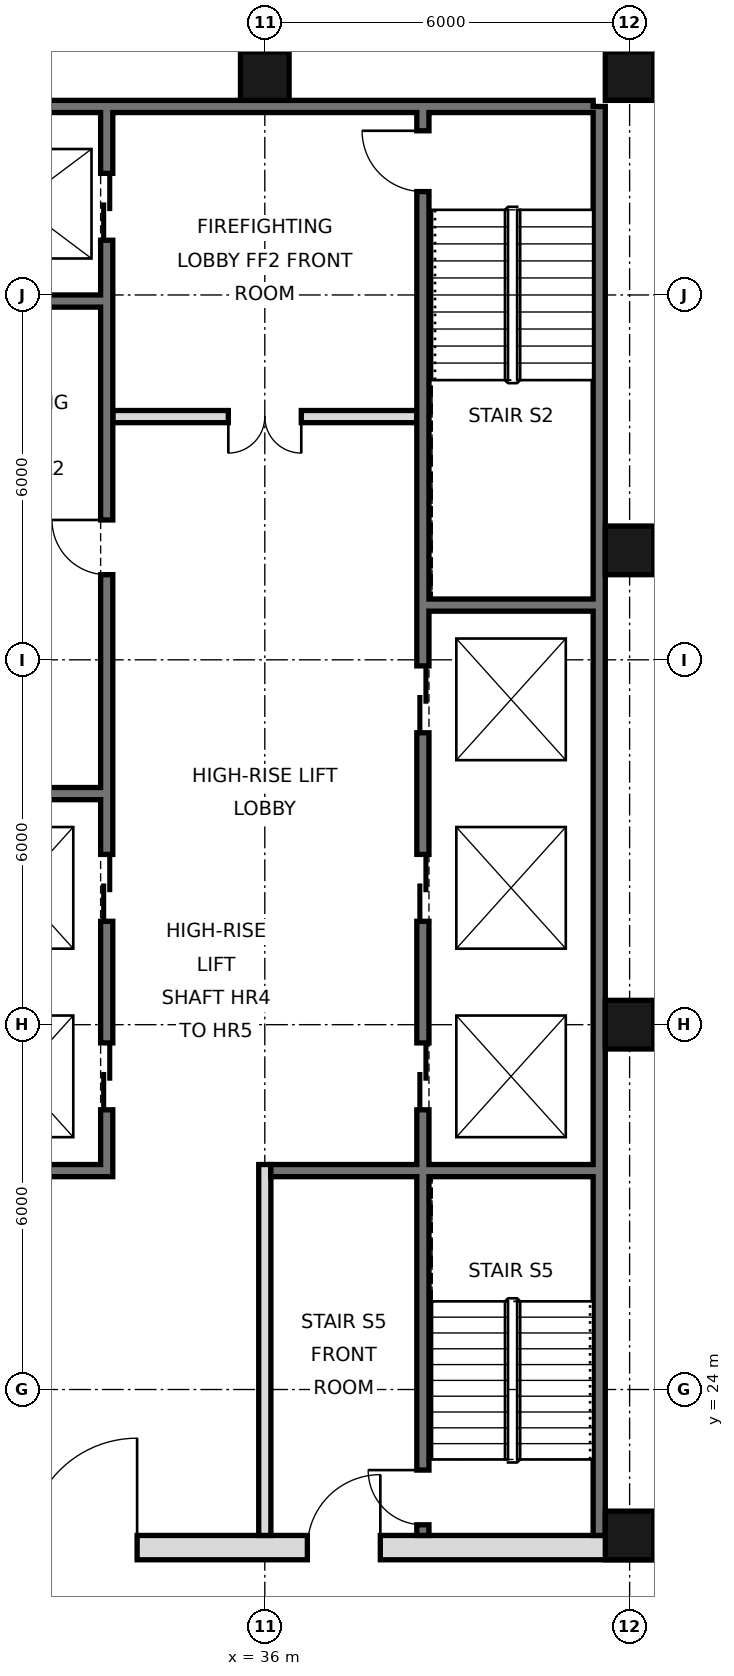
"""IFC4 building model, lengths in metres.
Left out: names, types, materials, properties, quantities, classifications, styles, units other than length and angle.
Written with IfcOpenShell. Run it as: python <this file> out.ifc"""

import sys

from ifc_helpers import new_model, si_unit, direction, frame, frame_2d, origin, origin_2d, place, context, subcontext, project, spatial, rectangle, hollow_rectangle, extrude, element, fill, save


model = new_model("IFC4")
c1 = context("Model", 3, precision=1e-05, world=origin(), true_north=direction((0.0, 1.0)))
c2 = subcontext(c1, "Body", "Model", "MODEL_VIEW")
j1 = project(units=[si_unit("LENGTHUNIT", "METRE"), si_unit("PLANEANGLEUNIT", "RADIAN")], contexts=[c1])
p1 = place(None, origin())
s1 = spatial("IfcSite", under=j1, at=p1, CompositionType="ELEMENT")
p2 = place(p1, origin())
s2 = spatial("IfcBuilding", under=s1, at=p2, CompositionType="ELEMENT")
p3 = place(p2, frame((0.0, 0.0, 222.6)))
s3 = spatial("IfcBuildingStorey", under=s2, at=p3, CompositionType="ELEMENT", Elevation=222.6)
for number, where, z_axis, x_axis in (
    (1, (36.0, 45.6, 0.0), (0.0, 0.0, 1.0), (1.0, 0.0, 0.0)),
    (2, (42.0, 21.6, 0.0), (0.0, 0.0, 1.0), (1.0, 0.0, 0.0)),
    (3, (42.0, 30.0, 0.0), (0.0, 0.0, 1.0), (1.0, 0.0, 0.0)),
    (4, (42.0, 37.8, 0.0), (0.0, 0.0, 1.0), (1.0, 0.0, 0.0)),
    (5, (42.0, 45.6, 0.0), (0.0, 0.0, 1.0), (1.0, 0.0, 0.0)),
):
    element("IfcColumn", number, at=place(p3, frame(where, z_axis=z_axis, x_axis=x_axis)), inside=s3, PredefinedType="COLUMN", context=c2, shape_type="SweptSolid", body=[
        extrude(hollow_rectangle(XDim=0.8, YDim=0.8, WallThickness=0.04, at=origin_2d()), origin(), (0.0, 0.0, 1.0), 3.6),
    ])
p4 = place(p3, frame((41.5, 21.6, 0.0), z_axis=(0.0, 0.0, 1.0), x_axis=(0.0, 1.0, 0.0)))
e6 = element("IfcWall", 6, at=p4, inside=s3, PredefinedType="SOLIDWALL", context=c2, shape_type="SweptSolid", body=[
    extrude(rectangle(XDim=23.5, YDim=0.2, at=frame_2d((11.75, 0.0))), origin(), (0.0, 0.0, 1.0), 3.42),
])
p5 = place(p3, frame((6.6, 45.1, 0.0), z_axis=(0.0, 0.0, 1.0), x_axis=(1.0, 0.0, 0.0)))
e7 = element("IfcWall", 7, at=p5, inside=s3, PredefinedType="SOLIDWALL", context=c2, shape_type="SweptSolid", body=[
    extrude(rectangle(XDim=34.8, YDim=0.2, at=frame_2d((17.4, 0.0))), origin(), (0.0, 0.0, 1.0), 3.42),
])
p6 = place(p3, frame((5.6, 21.4, 0.0), z_axis=(0.0, 0.0, 1.0), x_axis=(1.0, 0.0, 0.0)))
e8 = element("IfcWall", 8, at=p6, inside=s3, PredefinedType="SOLIDWALL", context=c2, shape_type="SweptSolid", body=[
    extrude(rectangle(XDim=36.8, YDim=0.4, at=frame_2d((18.4, 0.0))), origin(), (0.0, 0.0, 1.0), 3.42),
])
p7 = place(p6, frame((8.5, 0.0, 0.0)))
e9 = element("IfcOpeningElement", 9, at=p7, cuts=e8, PredefinedType="OPENING", context=c2, shape_type="SweptSolid", body=[
    extrude(rectangle(XDim=1.8, YDim=2.1, at=frame_2d((0.9, 1.05))), frame((0.0, 0.21, 0.0), z_axis=(0.0, -1.0, 0.0), x_axis=(1.0, 0.0, 0.0)), (0.0, 0.0, 1.0), 0.42),
])
p8 = place(p6, frame((17.5, 0.0, 0.0)))
e10 = element("IfcOpeningElement", 10, at=p8, cuts=e8, PredefinedType="OPENING", context=c2, shape_type="SweptSolid", body=[
    extrude(rectangle(XDim=1.8, YDim=2.1, at=frame_2d((0.9, 1.05))), frame((0.0, 0.21, 0.0), z_axis=(0.0, -1.0, 0.0), x_axis=(1.0, 0.0, 0.0)), (0.0, 0.0, 1.0), 0.42),
])
p9 = place(p6, frame((26.5, 0.0, 0.0)))
e11 = element("IfcOpeningElement", 11, at=p9, cuts=e8, PredefinedType="OPENING", context=c2, shape_type="SweptSolid", body=[
    extrude(rectangle(XDim=1.8, YDim=2.1, at=frame_2d((0.9, 1.05))), frame((0.0, 0.21, 0.0), z_axis=(0.0, -1.0, 0.0), x_axis=(1.0, 0.0, 0.0)), (0.0, 0.0, 1.0), 0.42),
])
p10 = place(p6, frame((4.5, 0.0, 0.0)))
e12 = element("IfcOpeningElement", 12, at=p10, cuts=e8, PredefinedType="OPENING", context=c2, shape_type="SweptSolid", body=[
    extrude(rectangle(XDim=1.2, YDim=2.1, at=frame_2d((0.6, 1.05))), frame((0.0, 0.21, 0.0), z_axis=(0.0, -1.0, 0.0), x_axis=(1.0, 0.0, 0.0)), (0.0, 0.0, 1.0), 0.42),
])
p11 = place(p6, frame((31.1, 0.0, 0.0)))
e13 = element("IfcOpeningElement", 13, at=p11, cuts=e8, PredefinedType="OPENING", context=c2, shape_type="SweptSolid", body=[
    extrude(rectangle(XDim=1.2, YDim=2.1, at=frame_2d((0.6, 1.05))), frame((0.0, 0.21, 0.0), z_axis=(0.0, -1.0, 0.0), x_axis=(1.0, 0.0, 0.0)), (0.0, 0.0, 1.0), 0.42),
])
p12 = place(p3, frame((33.4, 27.5, 0.0), z_axis=(0.0, 0.0, 1.0), x_axis=(0.0, 1.0, 0.0)))
e14 = element("IfcWall", 14, at=p12, inside=s3, PredefinedType="SOLIDWALL", context=c2, shape_type="SweptSolid", body=[
    extrude(rectangle(XDim=17.5, YDim=0.2, at=frame_2d((8.75, 0.0))), origin(), (0.0, 0.0, 1.0), 3.42),
])
p13 = place(p12, frame((1.1, 0.0, 0.0)))
e15 = element("IfcOpeningElement", 15, at=p13, cuts=e14, PredefinedType="OPENING", context=c2, shape_type="SweptSolid", body=[
    extrude(rectangle(XDim=1.1, YDim=2.1, at=frame_2d((0.55, 1.05))), frame((0.0, 0.11, 0.0), z_axis=(0.0, -1.0, 0.0), x_axis=(1.0, 0.0, 0.0)), (0.0, 0.0, 1.0), 0.22),
])
p14 = place(p12, frame((4.2, 0.0, 0.0)))
e16 = element("IfcOpeningElement", 16, at=p14, cuts=e14, PredefinedType="OPENING", context=c2, shape_type="SweptSolid", body=[
    extrude(rectangle(XDim=1.1, YDim=2.1, at=frame_2d((0.55, 1.05))), frame((0.0, 0.11, 0.0), z_axis=(0.0, -1.0, 0.0), x_axis=(1.0, 0.0, 0.0)), (0.0, 0.0, 1.0), 0.22),
])
p15 = place(p12, frame((15.4, 0.0, 0.0)))
e17 = element("IfcOpeningElement", 17, at=p15, cuts=e14, PredefinedType="OPENING", context=c2, shape_type="SweptSolid", body=[
    extrude(rectangle(XDim=1.1, YDim=2.1, at=frame_2d((0.55, 1.05))), frame((0.0, 0.11, 0.0), z_axis=(0.0, -1.0, 0.0), x_axis=(1.0, 0.0, 0.0)), (0.0, 0.0, 1.0), 0.22),
])
p16 = place(p12, frame((9.9, 0.0, 0.0)))
e18 = element("IfcOpeningElement", 18, at=p16, cuts=e14, PredefinedType="OPENING", context=c2, shape_type="SweptSolid", body=[
    extrude(rectangle(XDim=0.9, YDim=2.1, at=frame_2d((0.45, 1.05))), frame((0.0, 0.11, 0.0), z_axis=(0.0, -1.0, 0.0), x_axis=(1.0, 0.0, 0.0)), (0.0, 0.0, 1.0), 0.22),
])
p17 = place(p3, frame((36.0, 21.6, 0.0), z_axis=(0.0, 0.0, 1.0), x_axis=(0.0, 1.0, 0.0)))
e19 = element("IfcWall", 19, at=p17, inside=s3, PredefinedType="PARTITIONING", context=c2, shape_type="SweptSolid", body=[
    extrude(rectangle(XDim=6.1, YDim=0.2, at=frame_2d((3.05, 0.0))), origin(), (0.0, 0.0, 1.0), 3.42),
])
p18 = place(p3, frame((38.6, 21.6, 0.0), z_axis=(0.0, 0.0, 1.0), x_axis=(0.0, 1.0, 0.0)))
e20 = element("IfcWall", 20, at=p18, inside=s3, PredefinedType="SOLIDWALL", context=c2, shape_type="SweptSolid", body=[
    extrude(rectangle(XDim=23.4, YDim=0.2, at=frame_2d((11.7, 0.0))), origin(), (0.0, 0.0, 1.0), 3.42),
])
p19 = place(p18, frame((7.0, 0.0, 0.0)))
e21 = element("IfcOpeningElement", 21, at=p19, cuts=e20, PredefinedType="OPENING", context=c2, shape_type="SweptSolid", body=[
    extrude(rectangle(XDim=1.1, YDim=2.1, at=frame_2d((0.55, 1.05))), frame((0.0, 0.11, 0.0), z_axis=(0.0, -1.0, 0.0), x_axis=(1.0, 0.0, 0.0)), (0.0, 0.0, 1.0), 0.22),
])
p20 = place(p18, frame((10.1, 0.0, 0.0)))
e22 = element("IfcOpeningElement", 22, at=p20, cuts=e20, PredefinedType="OPENING", context=c2, shape_type="SweptSolid", body=[
    extrude(rectangle(XDim=1.1, YDim=2.1, at=frame_2d((0.55, 1.05))), frame((0.0, 0.11, 0.0), z_axis=(0.0, -1.0, 0.0), x_axis=(1.0, 0.0, 0.0)), (0.0, 0.0, 1.0), 0.22),
])
p21 = place(p18, frame((13.2, 0.0, 0.0)))
e23 = element("IfcOpeningElement", 23, at=p21, cuts=e20, PredefinedType="OPENING", context=c2, shape_type="SweptSolid", body=[
    extrude(rectangle(XDim=1.1, YDim=2.1, at=frame_2d((0.55, 1.05))), frame((0.0, 0.11, 0.0), z_axis=(0.0, -1.0, 0.0), x_axis=(1.0, 0.0, 0.0)), (0.0, 0.0, 1.0), 0.22),
])
p22 = place(p18, frame((22.1, 0.0, 0.0)))
e24 = element("IfcOpeningElement", 24, at=p22, cuts=e20, PredefinedType="OPENING", context=c2, shape_type="SweptSolid", body=[
    extrude(rectangle(XDim=1.0, YDim=2.1, at=frame_2d((0.5, 1.05))), frame((0.0, 0.11, 0.0), z_axis=(0.0, -1.0, 0.0), x_axis=(1.0, 0.0, 0.0)), (0.0, 0.0, 1.0), 0.22),
])
p23 = place(p18, frame((0.175, 0.0, 0.0)))
e25 = element("IfcOpeningElement", 25, at=p23, cuts=e20, PredefinedType="OPENING", context=c2, shape_type="SweptSolid", body=[
    extrude(rectangle(XDim=0.9, YDim=2.1, at=frame_2d((0.45, 1.05))), frame((0.0, 0.11, 0.0), z_axis=(0.0, -1.0, 0.0), x_axis=(1.0, 0.0, 0.0)), (0.0, 0.0, 1.0), 0.22),
])
p24 = place(p3, frame((30.6, 27.6, 0.0), z_axis=(0.0, 0.0, 1.0), x_axis=(1.0, 0.0, 0.0)))
e26 = element("IfcWall", 26, at=p24, inside=s3, PredefinedType="SOLIDWALL", context=c2, shape_type="SweptSolid", body=[
    extrude(rectangle(XDim=2.7, YDim=0.2, at=frame_2d((1.35, 0.0))), origin(), (0.0, 0.0, 1.0), 3.42),
])
p25 = place(p3, frame((36.1, 27.6, 0.0), z_axis=(0.0, 0.0, 1.0), x_axis=(1.0, 0.0, 0.0)))
e27 = element("IfcWall", 27, at=p25, inside=s3, PredefinedType="SOLIDWALL", context=c2, shape_type="SweptSolid", body=[
    extrude(rectangle(XDim=5.3, YDim=0.2, at=frame_2d((2.65, 0.0))), origin(), (0.0, 0.0, 1.0), 3.42),
])
for number, where, z_axis, x_axis in (
    (28, (30.6, 33.8, 0.0), (0.0, 0.0, 1.0), (1.0, 0.0, 0.0)),
    (29, (38.7, 36.9, 0.0), (0.0, 0.0, 1.0), (1.0, 0.0, 0.0)),
):
    element("IfcWall", number, at=place(p3, frame(where, z_axis=z_axis, x_axis=x_axis)), inside=s3, PredefinedType="SOLIDWALL", context=c2, shape_type="SweptSolid", body=[
        extrude(rectangle(XDim=2.7, YDim=0.2, at=frame_2d((1.35, 0.0))), origin(), (0.0, 0.0, 1.0), 3.42),
    ])
p26 = place(p3, frame((33.5, 40.0, 0.0), z_axis=(0.0, 0.0, 1.0), x_axis=(1.0, 0.0, 0.0)))
e30 = element("IfcWall", 30, at=p26, inside=s3, PredefinedType="PARTITIONING", context=c2, shape_type="SweptSolid", body=[
    extrude(rectangle(XDim=5.0, YDim=0.2, at=frame_2d((2.5, 0.0))), origin(), (0.0, 0.0, 1.0), 3.42),
])
p27 = place(p26, frame((1.9, 0.0, 0.0)))
e31 = element("IfcOpeningElement", 31, at=p27, cuts=e30, PredefinedType="OPENING", context=c2, shape_type="SweptSolid", body=[
    extrude(rectangle(XDim=1.2, YDim=2.1, at=frame_2d((0.6, 1.05))), frame((0.0, 0.11, 0.0), z_axis=(0.0, -1.0, 0.0), x_axis=(1.0, 0.0, 0.0)), (0.0, 0.0, 1.0), 0.22),
])
p28 = place(p3, frame((30.6, 41.9, 0.0), z_axis=(0.0, 0.0, 1.0), x_axis=(1.0, 0.0, 0.0)))
e32 = element("IfcWall", 32, at=p28, inside=s3, PredefinedType="SOLIDWALL", context=c2, shape_type="SweptSolid", body=[
    extrude(rectangle(XDim=2.7, YDim=0.2, at=frame_2d((1.35, 0.0))), origin(), (0.0, 0.0, 1.0), 3.42),
])
p29 = place(p9, frame((1.8, 0.0, 0.0), z_axis=(0.0, 0.0, 1.0), x_axis=(-1.0, 0.0, 0.0)))
e33 = element("IfcDoor", 33, at=p29, inside=s3, OperationType="SINGLE_SWING_LEFT", PredefinedType="DOOR", context=c2, shape_type="SweptSolid", body=[
    extrude(rectangle(XDim=1.8, YDim=2.1, at=frame_2d((0.9, 1.05))), frame((0.0, 0.025, 0.0), z_axis=(0.0, -1.0, 0.0), x_axis=(1.0, 0.0, 0.0)), (0.0, 0.0, 1.0), 0.05),
])
fill(e11, e33)
p30 = place(p11, frame((1.2, 0.0, 0.0), z_axis=(0.0, 0.0, 1.0), x_axis=(-1.0, 0.0, 0.0)))
e34 = element("IfcDoor", 34, at=p30, inside=s3, OperationType="SINGLE_SWING_LEFT", PredefinedType="DOOR", context=c2, shape_type="SweptSolid", body=[
    extrude(rectangle(XDim=1.2, YDim=2.1, at=frame_2d((0.6, 1.05))), frame((0.0, 0.025, 0.0), z_axis=(0.0, -1.0, 0.0), x_axis=(1.0, 0.0, 0.0)), (0.0, 0.0, 1.0), 0.05),
])
fill(e13, e34)
p31 = place(p27, frame((1.2, 0.0, 0.0), z_axis=(0.0, 0.0, 1.0), x_axis=(-1.0, 0.0, 0.0)))
e35 = element("IfcDoor", 35, at=p31, inside=s3, OperationType="DOUBLE_DOOR_SINGLE_SWING", PredefinedType="DOOR", context=c2, shape_type="SweptSolid", body=[
    extrude(rectangle(XDim=1.2, YDim=2.1, at=frame_2d((0.6, 1.05))), frame((0.0, 0.025, 0.0), z_axis=(0.0, -1.0, 0.0), x_axis=(1.0, 0.0, 0.0)), (0.0, 0.0, 1.0), 0.05),
])
fill(e31, e35)
p32 = place(p19, origin())
e36 = element("IfcDoor", 36, at=p32, inside=s3, OperationType="DOUBLE_DOOR_SLIDING", PredefinedType="DOOR", context=c2, shape_type="SweptSolid", body=[
    extrude(rectangle(XDim=1.1, YDim=2.1, at=frame_2d((0.55, 1.05))), frame((0.0, 0.025, 0.0), z_axis=(0.0, -1.0, 0.0), x_axis=(1.0, 0.0, 0.0)), (0.0, 0.0, 1.0), 0.05),
])
fill(e21, e36)
p33 = place(p20, origin())
e37 = element("IfcDoor", 37, at=p33, inside=s3, OperationType="DOUBLE_DOOR_SLIDING", PredefinedType="DOOR", context=c2, shape_type="SweptSolid", body=[
    extrude(rectangle(XDim=1.1, YDim=2.1, at=frame_2d((0.55, 1.05))), frame((0.0, 0.025, 0.0), z_axis=(0.0, -1.0, 0.0), x_axis=(1.0, 0.0, 0.0)), (0.0, 0.0, 1.0), 0.05),
])
fill(e22, e37)
p34 = place(p21, origin())
e38 = element("IfcDoor", 38, at=p34, inside=s3, OperationType="DOUBLE_DOOR_SLIDING", PredefinedType="DOOR", context=c2, shape_type="SweptSolid", body=[
    extrude(rectangle(XDim=1.1, YDim=2.1, at=frame_2d((0.55, 1.05))), frame((0.0, 0.025, 0.0), z_axis=(0.0, -1.0, 0.0), x_axis=(1.0, 0.0, 0.0)), (0.0, 0.0, 1.0), 0.05),
])
fill(e23, e38)
p35 = place(p13, origin())
e39 = element("IfcDoor", 39, at=p35, inside=s3, OperationType="DOUBLE_DOOR_SLIDING", PredefinedType="DOOR", context=c2, shape_type="SweptSolid", body=[
    extrude(rectangle(XDim=1.1, YDim=2.1, at=frame_2d((0.55, 1.05))), frame((0.0, 0.025, 0.0), z_axis=(0.0, -1.0, 0.0), x_axis=(1.0, 0.0, 0.0)), (0.0, 0.0, 1.0), 0.05),
])
fill(e15, e39)
p36 = place(p14, origin())
e40 = element("IfcDoor", 40, at=p36, inside=s3, OperationType="DOUBLE_DOOR_SLIDING", PredefinedType="DOOR", context=c2, shape_type="SweptSolid", body=[
    extrude(rectangle(XDim=1.1, YDim=2.1, at=frame_2d((0.55, 1.05))), frame((0.0, 0.025, 0.0), z_axis=(0.0, -1.0, 0.0), x_axis=(1.0, 0.0, 0.0)), (0.0, 0.0, 1.0), 0.05),
])
fill(e16, e40)
p37 = place(p15, origin())
e41 = element("IfcDoor", 41, at=p37, inside=s3, OperationType="DOUBLE_DOOR_SLIDING", PredefinedType="DOOR", context=c2, shape_type="SweptSolid", body=[
    extrude(rectangle(XDim=1.1, YDim=2.1, at=frame_2d((0.55, 1.05))), frame((0.0, 0.025, 0.0), z_axis=(0.0, -1.0, 0.0), x_axis=(1.0, 0.0, 0.0)), (0.0, 0.0, 1.0), 0.05),
])
fill(e17, e41)
p38 = place(p22, frame((1.0, 0.0, 0.0), z_axis=(0.0, 0.0, 1.0), x_axis=(-1.0, 0.0, 0.0)))
e42 = element("IfcDoor", 42, at=p38, inside=s3, OperationType="SINGLE_SWING_LEFT", PredefinedType="DOOR", context=c2, shape_type="SweptSolid", body=[
    extrude(rectangle(XDim=1.0, YDim=2.1, at=frame_2d((0.5, 1.05))), frame((0.0, 0.025, 0.0), z_axis=(0.0, -1.0, 0.0), x_axis=(1.0, 0.0, 0.0)), (0.0, 0.0, 1.0), 0.05),
])
fill(e24, e42)
p39 = place(p23, frame((0.9, 0.0, 0.0), z_axis=(0.0, 0.0, 1.0), x_axis=(-1.0, 0.0, 0.0)))
e43 = element("IfcDoor", 43, at=p39, inside=s3, OperationType="SINGLE_SWING_LEFT", PredefinedType="DOOR", context=c2, shape_type="SweptSolid", body=[
    extrude(rectangle(XDim=0.9, YDim=2.1, at=frame_2d((0.45, 1.05))), frame((0.0, 0.025, 0.0), z_axis=(0.0, -1.0, 0.0), x_axis=(1.0, 0.0, 0.0)), (0.0, 0.0, 1.0), 0.05),
])
fill(e25, e43)
p40 = place(p16, frame((0.9, 0.0, 0.0), z_axis=(0.0, 0.0, 1.0), x_axis=(-1.0, 0.0, 0.0)))
e44 = element("IfcDoor", 44, at=p40, inside=s3, OperationType="SINGLE_SWING_LEFT", PredefinedType="DOOR", context=c2, shape_type="SweptSolid", body=[
    extrude(rectangle(XDim=0.9, YDim=2.1, at=frame_2d((0.45, 1.05))), frame((0.0, 0.025, 0.0), z_axis=(0.0, -1.0, 0.0), x_axis=(1.0, 0.0, 0.0)), (0.0, 0.0, 1.0), 0.05),
])
fill(e18, e44)
save(model, sys.argv[1])
